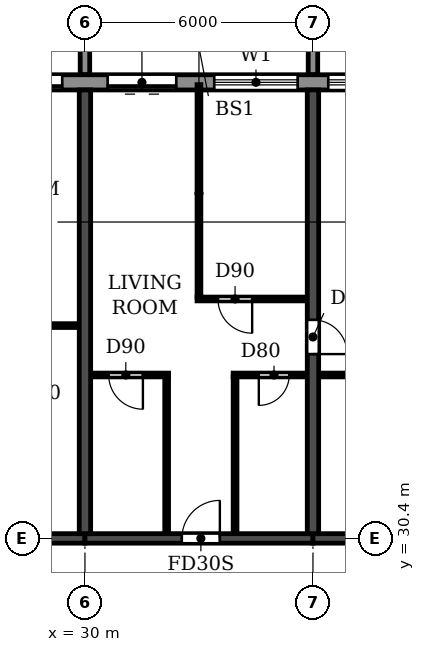
"""IFC4 building model, lengths in metres.
Left out: names, types, materials, properties, quantities, classifications, styles, units other than length and angle.
Written with IfcOpenShell. Run it as: python <this file> out.ifc"""

import sys

from ifc_helpers import new_model, si_unit, direction, frame, frame_2d, origin, place, context, subcontext, project, spatial, polyline, rectangle, outline, extrude, source, transform, mapped, element, fill, save


model = new_model("IFC4")
c1 = context("Model", 3, precision=1e-05, world=origin(), true_north=direction((0.0, 1.0)))
c2 = subcontext(c1, "Body", "Model", "MODEL_VIEW")
j1 = project(units=[si_unit("LENGTHUNIT", "METRE"), si_unit("PLANEANGLEUNIT", "RADIAN")], contexts=[c1])
p1 = place(None, origin())
s1 = spatial("IfcSite", under=j1, at=p1, CompositionType="ELEMENT")
p2 = place(p1, origin())
s2 = spatial("IfcBuilding", under=s1, at=p2, CompositionType="ELEMENT")
p3 = place(p2, frame((0.0, 0.0, 152.1)))
s3 = spatial("IfcBuildingStorey", under=s2, at=p3, CompositionType="ELEMENT", Elevation=152.1)
p4 = place(p3, frame((30.0, 30.525, 0.0), z_axis=(0.0, 0.0, 1.0), x_axis=(0.0, 1.0, 0.0)))
e1 = element("IfcWall", 1, at=p4, inside=s3, PredefinedType="SHEAR", context=c2, shape_type="SweptSolid", body=[
    extrude(rectangle(XDim=11.675, YDim=0.3, at=frame_2d((5.837, 0.0))), origin(), (0.0, 0.0, 1.0), 3.07),
])
p5 = place(p3, frame((36.0, 30.525, 0.0), z_axis=(0.0, 0.0, 1.0), x_axis=(0.0, 1.0, 0.0)))
e2 = element("IfcWall", 2, at=p5, inside=s3, PredefinedType="SHEAR", context=c2, shape_type="SweptSolid", body=[
    extrude(rectangle(XDim=11.675, YDim=0.3, at=frame_2d((5.837, 0.0))), origin(), (0.0, 0.0, 1.0), 3.07),
])
p6 = place(p5, frame((4.725, 0.0, 0.0)))
e3 = element("IfcOpeningElement", 3, at=p6, cuts=e2, PredefinedType="OPENING", context=c2, shape_type="SweptSolid", body=[
    extrude(rectangle(XDim=0.9, YDim=2.1, at=frame_2d((0.45, 1.05))), frame((0.0, 0.16, 0.0), z_axis=(0.0, -1.0, 0.0), x_axis=(1.0, 0.0, 0.0)), (0.0, 0.0, 1.0), 0.32),
])
p7 = place(p3, frame((24.0, 30.4, 0.0), z_axis=(0.0, 0.0, 1.0), x_axis=(1.0, 0.0, 0.0)))
e4 = element("IfcWall", 4, at=p7, inside=s3, PredefinedType="SHEAR", context=c2, shape_type="SweptSolid", body=[
    extrude(rectangle(XDim=6.0, YDim=0.25, at=frame_2d((3.0, 0.0))), origin(), (0.0, 0.0, 1.0), 2.47),
])
p8 = place(p7, frame((2.45, 0.0, 0.0)))
e5 = element("IfcOpeningElement", 5, at=p8, cuts=e4, PredefinedType="OPENING", context=c2, shape_type="SweptSolid", body=[
    extrude(rectangle(XDim=1.0, YDim=2.1, at=frame_2d((0.5, 1.05))), frame((0.0, 0.135, 0.0), z_axis=(0.0, -1.0, 0.0), x_axis=(1.0, 0.0, 0.0)), (0.0, 0.0, 1.0), 0.27),
])
p9 = place(p3, frame((30.0, 30.4, 0.0), z_axis=(0.0, 0.0, 1.0), x_axis=(1.0, 0.0, 0.0)))
e6 = element("IfcWall", 6, at=p9, inside=s3, PredefinedType="SHEAR", context=c2, shape_type="SweptSolid", body=[
    extrude(rectangle(XDim=6.0, YDim=0.25, at=frame_2d((3.0, 0.0))), origin(), (0.0, 0.0, 1.0), 2.47),
])
p10 = place(p9, frame((2.55, 0.0, 0.0)))
e7 = element("IfcOpeningElement", 7, at=p10, cuts=e6, PredefinedType="OPENING", context=c2, shape_type="SweptSolid", body=[
    extrude(rectangle(XDim=1.0, YDim=2.1, at=frame_2d((0.5, 1.05))), frame((0.0, 0.135, 0.0), z_axis=(0.0, -1.0, 0.0), x_axis=(1.0, 0.0, 0.0)), (0.0, 0.0, 1.0), 0.27),
])
p11 = place(p3, frame((36.0, 30.4, 0.0), z_axis=(0.0, 0.0, 1.0), x_axis=(1.0, 0.0, 0.0)))
e8 = element("IfcWall", 8, at=p11, inside=s3, PredefinedType="SHEAR", context=c2, shape_type="SweptSolid", body=[
    extrude(rectangle(XDim=6.0, YDim=0.25, at=frame_2d((3.0, 0.0))), origin(), (0.0, 0.0, 1.0), 2.47),
])
p12 = place(p3, frame((85.317, 42.4, 0.0), z_axis=(0.0, 0.0, 1.0), x_axis=(-1.0, 0.0, 0.0)))
e9 = element("IfcWall", 9, at=p12, inside=s3, PredefinedType="STANDARD", context=c2, shape_type="SweptSolid", body=[
    extrude(rectangle(XDim=68.634, YDim=0.4, at=frame_2d((34.317, 0.0))), origin(), (0.0, 0.0, 1.0), 3.07),
])
p13 = place(p12, frame((64.917, 0.0, 0.0)))
e10 = element("IfcOpeningElement", 10, at=p13, cuts=e9, PredefinedType="OPENING", context=c2, shape_type="SweptSolid", body=[
    extrude(rectangle(XDim=1.8, YDim=2.4, at=frame_2d((0.9, 1.2))), frame((0.0, 0.21, 0.0), z_axis=(0.0, -1.0, 0.0), x_axis=(1.0, 0.0, 0.0)), (0.0, 0.0, 1.0), 0.42),
])
p14 = place(p12, frame((61.717, 0.0, 0.9)))
e11 = element("IfcOpeningElement", 11, at=p14, cuts=e9, PredefinedType="OPENING", context=c2, shape_type="SweptSolid", body=[
    extrude(rectangle(XDim=2.2, YDim=1.5, at=frame_2d((1.1, 0.75))), frame((0.0, 0.21, 0.0), z_axis=(0.0, -1.0, 0.0), x_axis=(1.0, 0.0, 0.0)), (0.0, 0.0, 1.0), 0.42),
])
p15 = place(p12, frame((58.717, 0.0, 0.9)))
e12 = element("IfcOpeningElement", 12, at=p15, cuts=e9, PredefinedType="OPENING", context=c2, shape_type="SweptSolid", body=[
    extrude(rectangle(XDim=2.2, YDim=1.5, at=frame_2d((1.1, 0.75))), frame((0.0, 0.21, 0.0), z_axis=(0.0, -1.0, 0.0), x_axis=(1.0, 0.0, 0.0)), (0.0, 0.0, 1.0), 0.42),
])
p16 = place(p12, frame((55.917, 0.0, 0.0)))
e13 = element("IfcOpeningElement", 13, at=p16, cuts=e9, PredefinedType="OPENING", context=c2, shape_type="SweptSolid", body=[
    extrude(rectangle(XDim=1.8, YDim=2.4, at=frame_2d((0.9, 1.2))), frame((0.0, 0.21, 0.0), z_axis=(0.0, -1.0, 0.0), x_axis=(1.0, 0.0, 0.0)), (0.0, 0.0, 1.0), 0.42),
])
p17 = place(p12, frame((52.917, 0.0, 0.0)))
e14 = element("IfcOpeningElement", 14, at=p17, cuts=e9, PredefinedType="OPENING", context=c2, shape_type="SweptSolid", body=[
    extrude(rectangle(XDim=1.8, YDim=2.4, at=frame_2d((0.9, 1.2))), frame((0.0, 0.21, 0.0), z_axis=(0.0, -1.0, 0.0), x_axis=(1.0, 0.0, 0.0)), (0.0, 0.0, 1.0), 0.42),
])
p18 = place(p12, frame((49.717, 0.0, 0.9)))
e15 = element("IfcOpeningElement", 15, at=p18, cuts=e9, PredefinedType="OPENING", context=c2, shape_type="SweptSolid", body=[
    extrude(rectangle(XDim=2.2, YDim=1.5, at=frame_2d((1.1, 0.75))), frame((0.0, 0.21, 0.0), z_axis=(0.0, -1.0, 0.0), x_axis=(1.0, 0.0, 0.0)), (0.0, 0.0, 1.0), 0.42),
])
p19 = place(p12, frame((46.717, 0.0, 0.9)))
e16 = element("IfcOpeningElement", 16, at=p19, cuts=e9, PredefinedType="OPENING", context=c2, shape_type="SweptSolid", body=[
    extrude(rectangle(XDim=2.2, YDim=1.5, at=frame_2d((1.1, 0.75))), frame((0.0, 0.21, 0.0), z_axis=(0.0, -1.0, 0.0), x_axis=(1.0, 0.0, 0.0)), (0.0, 0.0, 1.0), 0.42),
])
p20 = place(p12, frame((43.717, 0.0, 0.9)))
e17 = element("IfcOpeningElement", 17, at=p20, cuts=e9, PredefinedType="OPENING", context=c2, shape_type="SweptSolid", body=[
    extrude(rectangle(XDim=2.2, YDim=1.5, at=frame_2d((1.1, 0.75))), frame((0.0, 0.21, 0.0), z_axis=(0.0, -1.0, 0.0), x_axis=(1.0, 0.0, 0.0)), (0.0, 0.0, 1.0), 0.42),
])
p21 = place(p12, frame((40.917, 0.0, 0.0)))
e18 = element("IfcOpeningElement", 18, at=p21, cuts=e9, PredefinedType="OPENING", context=c2, shape_type="SweptSolid", body=[
    extrude(rectangle(XDim=1.8, YDim=2.4, at=frame_2d((0.9, 1.2))), frame((0.0, 0.21, 0.0), z_axis=(0.0, -1.0, 0.0), x_axis=(1.0, 0.0, 0.0)), (0.0, 0.0, 1.0), 0.42),
])
p22 = place(p12, frame((37.717, 0.0, 0.9)))
e19 = element("IfcOpeningElement", 19, at=p22, cuts=e9, PredefinedType="OPENING", context=c2, shape_type="SweptSolid", body=[
    extrude(rectangle(XDim=2.2, YDim=1.5, at=frame_2d((1.1, 0.75))), frame((0.0, 0.21, 0.0), z_axis=(0.0, -1.0, 0.0), x_axis=(1.0, 0.0, 0.0)), (0.0, 0.0, 1.0), 0.42),
])
p23 = place(p12, frame((34.917, 0.0, 0.0)))
e20 = element("IfcOpeningElement", 20, at=p23, cuts=e9, PredefinedType="OPENING", context=c2, shape_type="SweptSolid", body=[
    extrude(rectangle(XDim=1.8, YDim=2.4, at=frame_2d((0.9, 1.2))), frame((0.0, 0.21, 0.0), z_axis=(0.0, -1.0, 0.0), x_axis=(1.0, 0.0, 0.0)), (0.0, 0.0, 1.0), 0.42),
])
p24 = place(p12, frame((31.717, 0.0, 0.9)))
e21 = element("IfcOpeningElement", 21, at=p24, cuts=e9, PredefinedType="OPENING", context=c2, shape_type="SweptSolid", body=[
    extrude(rectangle(XDim=2.2, YDim=1.5, at=frame_2d((1.1, 0.75))), frame((0.0, 0.21, 0.0), z_axis=(0.0, -1.0, 0.0), x_axis=(1.0, 0.0, 0.0)), (0.0, 0.0, 1.0), 0.42),
])
p25 = place(p12, frame((28.717, 0.0, 0.9)))
e22 = element("IfcOpeningElement", 22, at=p25, cuts=e9, PredefinedType="OPENING", context=c2, shape_type="SweptSolid", body=[
    extrude(rectangle(XDim=2.2, YDim=1.5, at=frame_2d((1.1, 0.75))), frame((0.0, 0.21, 0.0), z_axis=(0.0, -1.0, 0.0), x_axis=(1.0, 0.0, 0.0)), (0.0, 0.0, 1.0), 0.42),
])
p26 = place(p12, frame((25.717, 0.0, 0.9)))
e23 = element("IfcOpeningElement", 23, at=p26, cuts=e9, PredefinedType="OPENING", context=c2, shape_type="SweptSolid", body=[
    extrude(rectangle(XDim=2.2, YDim=1.5, at=frame_2d((1.1, 0.75))), frame((0.0, 0.21, 0.0), z_axis=(0.0, -1.0, 0.0), x_axis=(1.0, 0.0, 0.0)), (0.0, 0.0, 1.0), 0.42),
])
p27 = place(p12, frame((22.717, 0.0, 0.9)))
e24 = element("IfcOpeningElement", 24, at=p27, cuts=e9, PredefinedType="OPENING", context=c2, shape_type="SweptSolid", body=[
    extrude(rectangle(XDim=2.2, YDim=1.5, at=frame_2d((1.1, 0.75))), frame((0.0, 0.21, 0.0), z_axis=(0.0, -1.0, 0.0), x_axis=(1.0, 0.0, 0.0)), (0.0, 0.0, 1.0), 0.42),
])
p28 = place(p12, frame((19.917, 0.0, 0.0)))
e25 = element("IfcOpeningElement", 25, at=p28, cuts=e9, PredefinedType="OPENING", context=c2, shape_type="SweptSolid", body=[
    extrude(rectangle(XDim=1.8, YDim=2.4, at=frame_2d((0.9, 1.2))), frame((0.0, 0.21, 0.0), z_axis=(0.0, -1.0, 0.0), x_axis=(1.0, 0.0, 0.0)), (0.0, 0.0, 1.0), 0.42),
])
p29 = place(p12, frame((16.717, 0.0, 0.9)))
e26 = element("IfcOpeningElement", 26, at=p29, cuts=e9, PredefinedType="OPENING", context=c2, shape_type="SweptSolid", body=[
    extrude(rectangle(XDim=2.2, YDim=1.5, at=frame_2d((1.1, 0.75))), frame((0.0, 0.21, 0.0), z_axis=(0.0, -1.0, 0.0), x_axis=(1.0, 0.0, 0.0)), (0.0, 0.0, 1.0), 0.42),
])
p30 = place(p12, frame((13.717, 0.0, 0.9)))
e27 = element("IfcOpeningElement", 27, at=p30, cuts=e9, PredefinedType="OPENING", context=c2, shape_type="SweptSolid", body=[
    extrude(rectangle(XDim=2.2, YDim=1.5, at=frame_2d((1.1, 0.75))), frame((0.0, 0.21, 0.0), z_axis=(0.0, -1.0, 0.0), x_axis=(1.0, 0.0, 0.0)), (0.0, 0.0, 1.0), 0.42),
])
p31 = place(p12, frame((10.917, 0.0, 0.0)))
e28 = element("IfcOpeningElement", 28, at=p31, cuts=e9, PredefinedType="OPENING", context=c2, shape_type="SweptSolid", body=[
    extrude(rectangle(XDim=1.8, YDim=2.4, at=frame_2d((0.9, 1.2))), frame((0.0, 0.21, 0.0), z_axis=(0.0, -1.0, 0.0), x_axis=(1.0, 0.0, 0.0)), (0.0, 0.0, 1.0), 0.42),
])
p32 = place(p12, frame((7.717, 0.0, 0.9)))
e29 = element("IfcOpeningElement", 29, at=p32, cuts=e9, PredefinedType="OPENING", context=c2, shape_type="SweptSolid", body=[
    extrude(rectangle(XDim=2.2, YDim=1.5, at=frame_2d((1.1, 0.75))), frame((0.0, 0.21, 0.0), z_axis=(0.0, -1.0, 0.0), x_axis=(1.0, 0.0, 0.0)), (0.0, 0.0, 1.0), 0.42),
])
p33 = place(p12, frame((4.717, 0.0, 0.9)))
e30 = element("IfcOpeningElement", 30, at=p33, cuts=e9, PredefinedType="OPENING", context=c2, shape_type="SweptSolid", body=[
    extrude(rectangle(XDim=2.2, YDim=1.5, at=frame_2d((1.1, 0.75))), frame((0.0, 0.21, 0.0), z_axis=(0.0, -1.0, 0.0), x_axis=(1.0, 0.0, 0.0)), (0.0, 0.0, 1.0), 0.42),
])
p34 = place(p12, frame((1.917, 0.0, 0.0)))
e31 = element("IfcOpeningElement", 31, at=p34, cuts=e9, PredefinedType="OPENING", context=c2, shape_type="SweptSolid", body=[
    extrude(rectangle(XDim=1.8, YDim=2.4, at=frame_2d((0.9, 1.2))), frame((0.0, 0.21, 0.0), z_axis=(0.0, -1.0, 0.0), x_axis=(1.0, 0.0, 0.0)), (0.0, 0.0, 1.0), 0.42),
])
m1 = source(origin(), c2, "Body", "SweptSolid", [
    extrude(outline(polyline([(0.0, 0.0), (0.25, 0.0), (0.25, 3.1), (0.0, 3.1), (0.0, 0.0)])), origin(), (0.0, 0.0, 1.0), 3.1),
])
for number, where in (
    (32, (29.875, 42.6, 0.0)),
    (33, (35.875, 42.6, 0.0)),
):
    element("IfcWall", number, at=place(p3, frame(where)), inside=s3, PredefinedType="STANDARD", context=c2, shape_type="MappedRepresentation", body=[
        mapped(m1, transform((0.0, 0.0, 0.0))),
    ])
p35 = place(p3, frame((30.16, 34.7, 0.0), z_axis=(0.0, 0.0, 1.0), x_axis=(1.0, 0.0, 0.0)))
e34 = element("IfcWall", 34, at=p35, inside=s3, PredefinedType="PARTITIONING", context=c2, shape_type="SweptSolid", body=[
    extrude(rectangle(XDim=2.04, YDim=0.1, at=frame_2d((1.02, 0.0))), origin(), (0.0, 0.0, 1.0), 3.07),
])
p36 = place(p35, frame((0.465, 0.0, 0.0)))
e35 = element("IfcOpeningElement", 35, at=p36, cuts=e34, PredefinedType="OPENING", context=c2, shape_type="SweptSolid", body=[
    extrude(rectangle(XDim=0.9, YDim=2.1, at=frame_2d((0.45, 1.05))), frame((0.0, 0.06, 0.0), z_axis=(0.0, -1.0, 0.0), x_axis=(1.0, 0.0, 0.0)), (0.0, 0.0, 1.0), 0.12),
])
p37 = place(p3, frame((33.9, 34.7, 0.0), z_axis=(0.0, 0.0, 1.0), x_axis=(1.0, 0.0, 0.0)))
e36 = element("IfcWall", 36, at=p37, inside=s3, PredefinedType="PARTITIONING", context=c2, shape_type="SweptSolid", body=[
    extrude(rectangle(XDim=1.94, YDim=0.1, at=frame_2d((0.97, 0.0))), origin(), (0.0, 0.0, 1.0), 3.07),
])
p38 = place(p37, frame((0.675, 0.0, 0.0)))
e37 = element("IfcOpeningElement", 37, at=p38, cuts=e36, PredefinedType="OPENING", context=c2, shape_type="SweptSolid", body=[
    extrude(rectangle(XDim=0.8, YDim=2.1, at=frame_2d((0.4, 1.05))), frame((0.0, 0.06, 0.0), z_axis=(0.0, -1.0, 0.0), x_axis=(1.0, 0.0, 0.0)), (0.0, 0.0, 1.0), 0.12),
])
p39 = place(p3, frame((36.16, 34.7, 0.0), z_axis=(0.0, 0.0, 1.0), x_axis=(1.0, 0.0, 0.0)))
e38 = element("IfcWall", 38, at=p39, inside=s3, PredefinedType="PARTITIONING", context=c2, shape_type="SweptSolid", body=[
    extrude(rectangle(XDim=2.94, YDim=0.1, at=frame_2d((1.47, 0.0))), origin(), (0.0, 0.0, 1.0), 3.07),
])
p40 = place(p39, frame((0.94, 0.0, 0.0)))
e39 = element("IfcOpeningElement", 39, at=p40, cuts=e38, PredefinedType="OPENING", context=c2, shape_type="SweptSolid", body=[
    extrude(rectangle(XDim=0.8, YDim=2.1, at=frame_2d((0.4, 1.05))), frame((0.0, 0.06, 0.0), z_axis=(0.0, -1.0, 0.0), x_axis=(1.0, 0.0, 0.0)), (0.0, 0.0, 1.0), 0.12),
])
p41 = place(p3, frame((27.8, 36.0, 0.0), z_axis=(0.0, 0.0, 1.0), x_axis=(1.0, 0.0, 0.0)))
e40 = element("IfcWall", 40, at=p41, inside=s3, PredefinedType="PARTITIONING", context=c2, shape_type="SweptSolid", body=[
    extrude(rectangle(XDim=2.04, YDim=0.1, at=frame_2d((1.02, 0.0))), origin(), (0.0, 0.0, 1.0), 3.07),
])
p42 = place(p3, frame((32.95, 36.7, 0.0), z_axis=(0.0, 0.0, 1.0), x_axis=(1.0, 0.0, 0.0)))
e41 = element("IfcWall", 41, at=p42, inside=s3, PredefinedType="PARTITIONING", context=c2, shape_type="SweptSolid", body=[
    extrude(rectangle(XDim=2.89, YDim=0.1, at=frame_2d((1.445, 0.0))), origin(), (0.0, 0.0, 1.0), 3.07),
])
p43 = place(p42, frame((0.55, 0.0, 0.0)))
e42 = element("IfcOpeningElement", 42, at=p43, cuts=e41, PredefinedType="OPENING", context=c2, shape_type="SweptSolid", body=[
    extrude(rectangle(XDim=0.9, YDim=2.1, at=frame_2d((0.45, 1.05))), frame((0.0, 0.06, 0.0), z_axis=(0.0, -1.0, 0.0), x_axis=(1.0, 0.0, 0.0)), (0.0, 0.0, 1.0), 0.12),
])
p44 = place(p3, frame((32.15, 30.535, 0.0), z_axis=(0.0, 0.0, 1.0), x_axis=(0.0, 1.0, 0.0)))
e43 = element("IfcWall", 43, at=p44, inside=s3, PredefinedType="PARTITIONING", context=c2, shape_type="SweptSolid", body=[
    extrude(rectangle(XDim=4.115, YDim=0.1, at=frame_2d((2.058, 0.0))), origin(), (0.0, 0.0, 1.0), 3.07),
])
p45 = place(p3, frame((33.0, 36.75, 0.0), z_axis=(0.0, 0.0, 1.0), x_axis=(0.0, 1.0, 0.0)))
e44 = element("IfcWall", 44, at=p45, inside=s3, PredefinedType="PARTITIONING", context=c2, shape_type="SweptSolid", body=[
    extrude(rectangle(XDim=5.59, YDim=0.1, at=frame_2d((2.795, 0.0))), origin(), (0.0, 0.0, 1.0), 3.07),
])
p46 = place(p3, frame((33.95, 30.535, 0.0), z_axis=(0.0, 0.0, 1.0), x_axis=(0.0, 1.0, 0.0)))
e45 = element("IfcWall", 45, at=p46, inside=s3, PredefinedType="PARTITIONING", context=c2, shape_type="SweptSolid", body=[
    extrude(rectangle(XDim=4.115, YDim=0.1, at=frame_2d((2.058, 0.0))), origin(), (0.0, 0.0, 1.0), 3.07),
])
p47 = place(p16, origin())
e46 = element("IfcDoor", 46, at=p47, inside=s3, OperationType="DOUBLE_DOOR_SLIDING", PredefinedType="DOOR", context=c2, shape_type="SweptSolid", body=[
    extrude(rectangle(XDim=1.8, YDim=2.4, at=frame_2d((0.9, 1.2))), frame((0.0, 0.025, 0.0), z_axis=(0.0, -1.0, 0.0), x_axis=(1.0, 0.0, 0.0)), (0.0, 0.0, 1.0), 0.05),
])
fill(e13, e46)
p48 = place(p17, origin())
e47 = element("IfcDoor", 47, at=p48, inside=s3, OperationType="DOUBLE_DOOR_SLIDING", PredefinedType="DOOR", context=c2, shape_type="SweptSolid", body=[
    extrude(rectangle(XDim=1.8, YDim=2.4, at=frame_2d((0.9, 1.2))), frame((0.0, 0.025, 0.0), z_axis=(0.0, -1.0, 0.0), x_axis=(1.0, 0.0, 0.0)), (0.0, 0.0, 1.0), 0.05),
])
fill(e14, e47)
p49 = place(p18, origin())
e48 = element("IfcWindow", 48, at=p49, inside=s3, PartitioningType="DOUBLE_PANEL_HORIZONTAL", PredefinedType="WINDOW", context=c2, shape_type="SweptSolid", body=[
    extrude(rectangle(XDim=2.2, YDim=1.5, at=frame_2d((1.1, 0.75))), frame((0.0, 0.03, 0.0), z_axis=(0.0, -1.0, 0.0), x_axis=(1.0, 0.0, 0.0)), (0.0, 0.0, 1.0), 0.06),
])
fill(e15, e48)
p50 = place(p19, origin())
e49 = element("IfcWindow", 49, at=p50, inside=s3, PartitioningType="DOUBLE_PANEL_HORIZONTAL", PredefinedType="WINDOW", context=c2, shape_type="SweptSolid", body=[
    extrude(rectangle(XDim=2.2, YDim=1.5, at=frame_2d((1.1, 0.75))), frame((0.0, 0.03, 0.0), z_axis=(0.0, -1.0, 0.0), x_axis=(1.0, 0.0, 0.0)), (0.0, 0.0, 1.0), 0.06),
])
fill(e16, e49)
p51 = place(p36, frame((0.9, 0.0, 0.0), z_axis=(0.0, 0.0, 1.0), x_axis=(-1.0, 0.0, 0.0)))
e50 = element("IfcDoor", 50, at=p51, inside=s3, OperationType="SINGLE_SWING_LEFT", PredefinedType="DOOR", context=c2, shape_type="SweptSolid", body=[
    extrude(rectangle(XDim=0.9, YDim=2.1, at=frame_2d((0.45, 1.05))), frame((0.0, 0.025, 0.0), z_axis=(0.0, -1.0, 0.0), x_axis=(1.0, 0.0, 0.0)), (0.0, 0.0, 1.0), 0.05),
])
fill(e35, e50)
p52 = place(p10, origin())
e51 = element("IfcDoor", 51, at=p52, inside=s3, OperationType="SINGLE_SWING_RIGHT", PredefinedType="DOOR", context=c2, shape_type="SweptSolid", body=[
    extrude(rectangle(XDim=1.0, YDim=2.1, at=frame_2d((0.5, 1.05))), frame((0.0, 0.025, 0.0), z_axis=(0.0, -1.0, 0.0), x_axis=(1.0, 0.0, 0.0)), (0.0, 0.0, 1.0), 0.05),
])
fill(e7, e51)
p53 = place(p43, frame((0.9, 0.0, 0.0), z_axis=(0.0, 0.0, 1.0), x_axis=(-1.0, 0.0, 0.0)))
e52 = element("IfcDoor", 52, at=p53, inside=s3, OperationType="SINGLE_SWING_LEFT", PredefinedType="DOOR", context=c2, shape_type="SweptSolid", body=[
    extrude(rectangle(XDim=0.9, YDim=2.1, at=frame_2d((0.45, 1.05))), frame((0.0, 0.025, 0.0), z_axis=(0.0, -1.0, 0.0), x_axis=(1.0, 0.0, 0.0)), (0.0, 0.0, 1.0), 0.05),
])
fill(e42, e52)
p54 = place(p38, frame((0.8, 0.0, 0.0), z_axis=(0.0, 0.0, 1.0), x_axis=(-1.0, 0.0, 0.0)))
e53 = element("IfcDoor", 53, at=p54, inside=s3, OperationType="SINGLE_SWING_RIGHT", PredefinedType="DOOR", context=c2, shape_type="SweptSolid", body=[
    extrude(rectangle(XDim=0.8, YDim=2.1, at=frame_2d((0.4, 1.05))), frame((0.0, 0.025, 0.0), z_axis=(0.0, -1.0, 0.0), x_axis=(1.0, 0.0, 0.0)), (0.0, 0.0, 1.0), 0.05),
])
fill(e37, e53)
p55 = place(p6, frame((0.9, 0.0, 0.0), z_axis=(0.0, 0.0, 1.0), x_axis=(-1.0, 0.0, 0.0)))
e54 = element("IfcDoor", 54, at=p55, inside=s3, OperationType="SINGLE_SWING_RIGHT", PredefinedType="DOOR", context=c2, shape_type="SweptSolid", body=[
    extrude(rectangle(XDim=0.9, YDim=2.1, at=frame_2d((0.45, 1.05))), frame((0.0, 0.025, 0.0), z_axis=(0.0, -1.0, 0.0), x_axis=(1.0, 0.0, 0.0)), (0.0, 0.0, 1.0), 0.05),
])
fill(e3, e54)
save(model, sys.argv[1])
